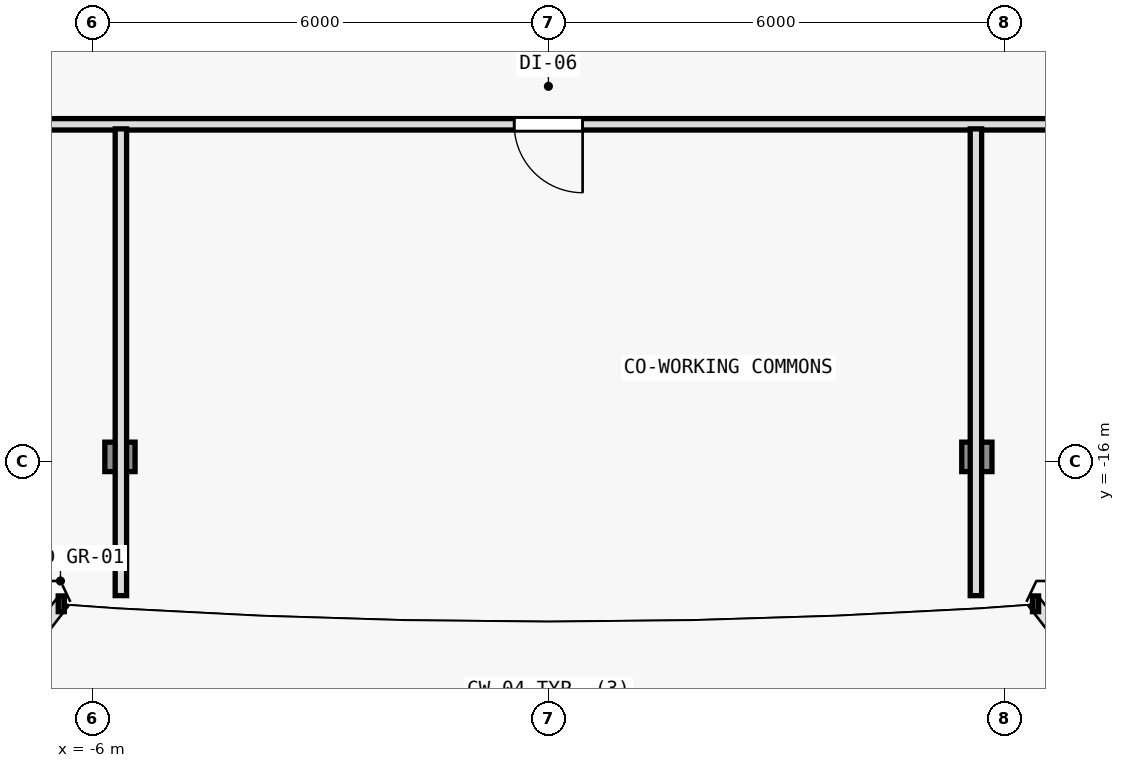
"""IFC4 building model, lengths in metres.
Left out: names, types, materials, properties, quantities, classifications, styles, units other than length and angle.
Written with IfcOpenShell. Run it as: python <this file> out.ifc"""

import sys

from ifc_helpers import new_model, si_unit, direction, frame, frame_2d, origin, origin_2d, place, context, subcontext, project, spatial, rectangle, i_section, extrude, element, fill, save


model = new_model("IFC4")
c1 = context("Model", 3, precision=1e-05, world=origin(), true_north=direction((0.0, 1.0)))
c2 = subcontext(c1, "Body", "Model", "MODEL_VIEW")
j1 = project(units=[si_unit("LENGTHUNIT", "METRE"), si_unit("PLANEANGLEUNIT", "RADIAN")], contexts=[c1])
p1 = place(None, origin())
s1 = spatial("IfcSite", under=j1, at=p1, CompositionType="ELEMENT")
p2 = place(p1, origin())
s2 = spatial("IfcBuilding", under=s1, at=p2, CompositionType="ELEMENT")
p3 = place(p2, frame((0.0, 0.0, 205.5)))
s3 = spatial("IfcBuildingStorey", under=s2, at=p3, CompositionType="ELEMENT", Elevation=205.5)
for number, where, z_axis, x_axis in (
    (1, (-5.637, -15.935, 0.006), (0.007, 0.035, 0.999), (-0.982, 0.191, 0.0)),
    (2, (5.637, -15.935, 0.006), (-0.007, 0.035, 0.999), (-0.982, -0.191, 0.0)),
):
    element("IfcColumn", number, at=place(p3, frame(where, z_axis=z_axis, x_axis=x_axis)), inside=s3, PredefinedType="COLUMN", context=c2, shape_type="SweptSolid", body=[
        extrude(i_section(OverallWidth=0.398, OverallDepth=0.387, WebThickness=0.013, FlangeThickness=0.022, FilletRadius=0.015, at=origin_2d()), origin(), (0.0, 0.0, 1.0), 3.591),
    ])
p4 = place(p3, frame((13.18, -11.56, 0.0), z_axis=(0.0, 0.0, 1.0), x_axis=(-1.0, 0.0, 0.0)))
e3 = element("IfcWall", 3, at=p4, inside=s3, PredefinedType="PARTITIONING", context=c2, shape_type="SweptSolid", body=[
    extrude(rectangle(XDim=23.04, YDim=0.15, at=frame_2d((11.52, 0.0))), origin(), (0.0, 0.0, 1.0), 2.825),
])
p5 = place(p4, frame((20.383, 0.0, 0.0)))
e4 = element("IfcOpeningElement", 4, at=p5, cuts=e3, PredefinedType="OPENING", context=c2, shape_type="SweptSolid", body=[
    extrude(rectangle(XDim=0.9, YDim=2.1, at=frame_2d((0.45, 1.05))), frame((0.0, 0.085, 0.0), z_axis=(0.0, -1.0, 0.0), x_axis=(1.0, 0.0, 0.0)), (0.0, 0.0, 1.0), 0.17),
])
p6 = place(p4, frame((12.73, 0.0, 0.0)))
e5 = element("IfcOpeningElement", 5, at=p6, cuts=e3, PredefinedType="OPENING", context=c2, shape_type="SweptSolid", body=[
    extrude(rectangle(XDim=0.9, YDim=2.1, at=frame_2d((0.45, 1.05))), frame((0.0, 0.085, 0.0), z_axis=(0.0, -1.0, 0.0), x_axis=(1.0, 0.0, 0.0)), (0.0, 0.0, 1.0), 0.17),
])
p7 = place(p4, frame((3.417, 0.0, 0.0)))
e6 = element("IfcOpeningElement", 6, at=p7, cuts=e3, PredefinedType="OPENING", context=c2, shape_type="SweptSolid", body=[
    extrude(rectangle(XDim=0.9, YDim=2.1, at=frame_2d((0.45, 1.05))), frame((0.0, 0.085, 0.0), z_axis=(0.0, -1.0, 0.0), x_axis=(1.0, 0.0, 0.0)), (0.0, 0.0, 1.0), 0.17),
])
for number, where, z_axis, x_axis in (
    (7, (-5.625, -11.62, 0.0), (0.0, 0.0, 1.0), (0.0, -1.0, 0.0)),
    (8, (5.625, -11.62, 0.0), (0.0, 0.0, 1.0), (0.0, -1.0, 0.0)),
):
    element("IfcWall", number, at=place(p3, frame(where, z_axis=z_axis, x_axis=x_axis)), inside=s3, PredefinedType="PARTITIONING", context=c2, shape_type="SweptSolid", body=[
        extrude(rectangle(XDim=6.14, YDim=0.15, at=frame_2d((3.07, 0.0))), origin(), (0.0, 0.0, 1.0), 2.775),
    ])
p8 = place(p6, origin())
e9 = element("IfcDoor", 9, at=p8, inside=s3, OperationType="SINGLE_SWING_LEFT", PredefinedType="DOOR", context=c2, shape_type="SweptSolid", body=[
    extrude(rectangle(XDim=0.9, YDim=2.1, at=frame_2d((0.45, 1.05))), frame((0.0, 0.025, 0.0), z_axis=(0.0, -1.0, 0.0), x_axis=(1.0, 0.0, 0.0)), (0.0, 0.0, 1.0), 0.05),
])
fill(e5, e9)
save(model, sys.argv[1])
